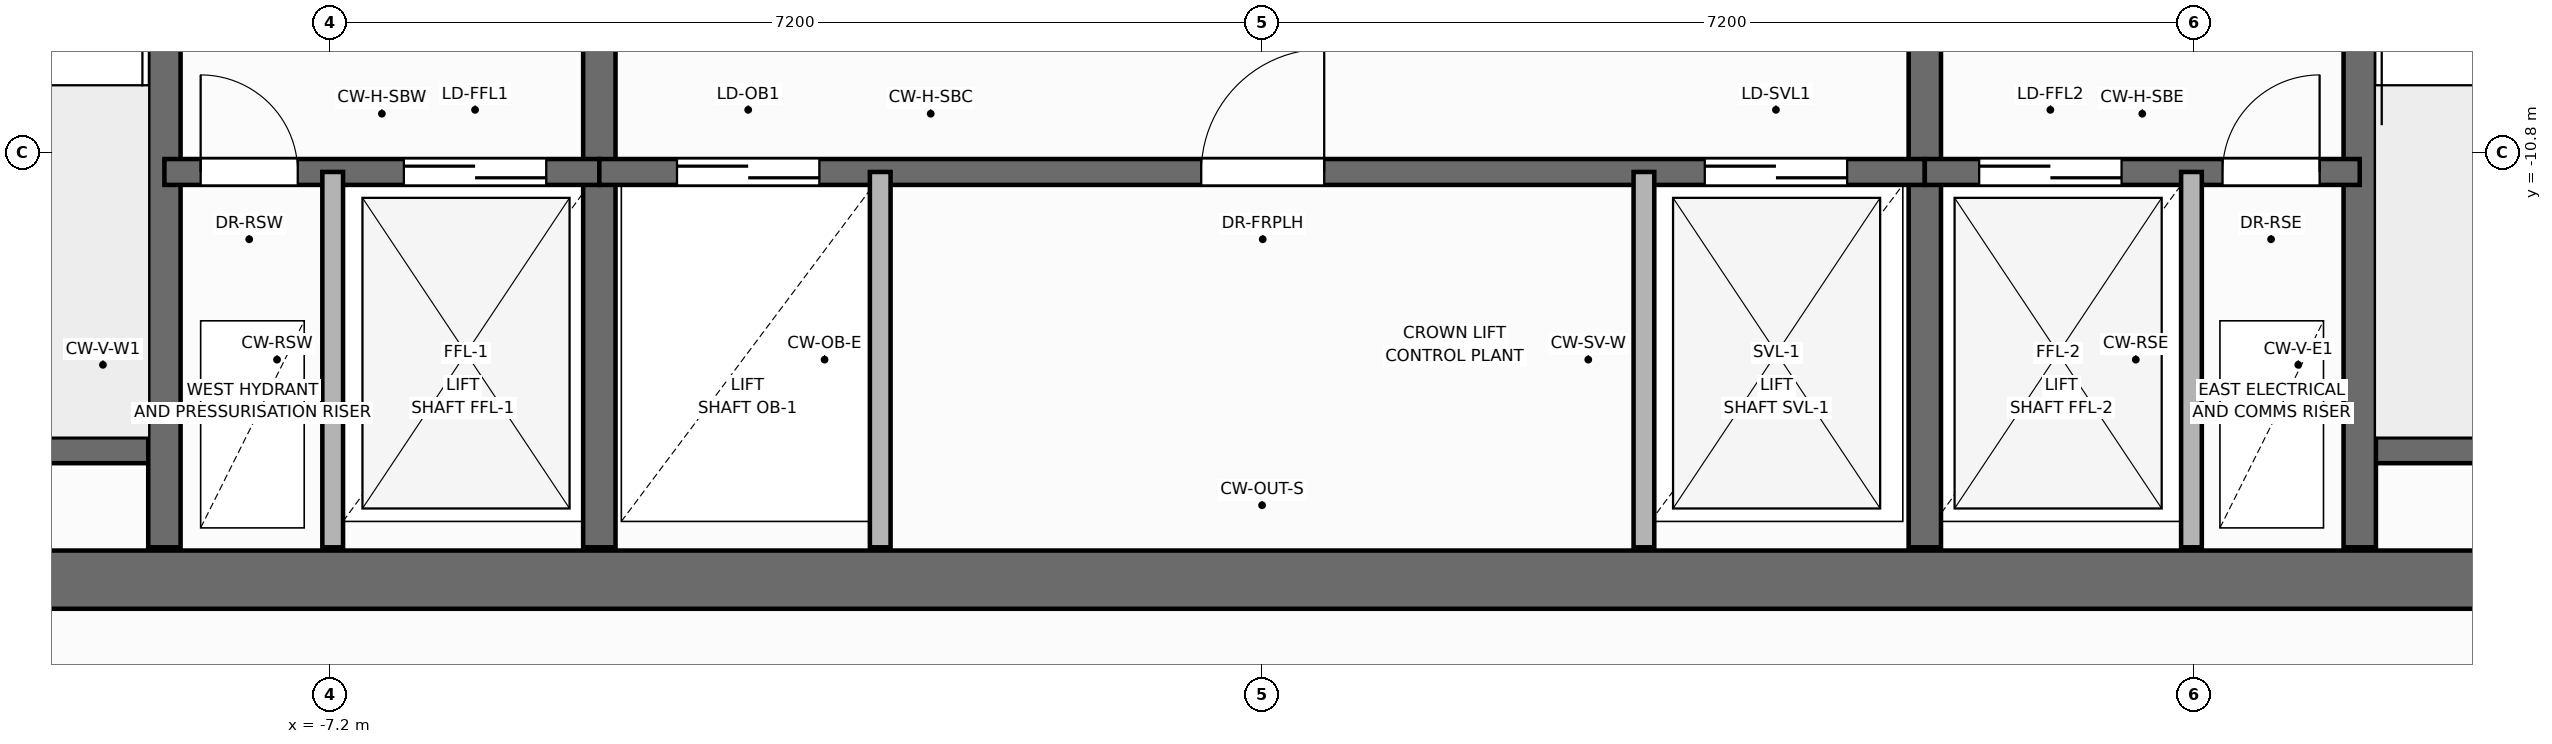
"""IFC4 building model, lengths in metres.
Left out: names, types, materials, properties, quantities, classifications, styles, units other than length and angle.
Written with IfcOpenShell. Run it as: python <this file> out.ifc"""

import sys

from ifc_helpers import new_model, si_unit, direction, frame, frame_2d, origin, place, context, subcontext, project, spatial, rectangle, extrude, element, fill, save


model = new_model("IFC4")
c1 = context("Model", 3, precision=1e-05, world=origin(), true_north=direction((0.0, 1.0)))
c2 = subcontext(c1, "Body", "Model", "MODEL_VIEW")
j1 = project(units=[si_unit("LENGTHUNIT", "METRE"), si_unit("PLANEANGLEUNIT", "RADIAN")], contexts=[c1])
p1 = place(None, origin())
s1 = spatial("IfcSite", under=j1, at=p1, CompositionType="ELEMENT")
p2 = place(p1, origin())
s2 = spatial("IfcBuilding", under=s1, at=p2, CompositionType="ELEMENT")
p3 = place(p2, frame((0.0, 0.0, 297.6)))
s3 = spatial("IfcBuildingStorey", under=s2, at=p3, CompositionType="ELEMENT", Elevation=297.6)
p4 = place(p3, frame((-12.65, -14.1, 0.0), z_axis=(0.0, 0.0, 1.0), x_axis=(1.0, 0.0, 0.0)))
e1 = element("IfcWall", 1, at=p4, inside=s3, PredefinedType="SHEAR", context=c2, shape_type="SweptSolid", body=[
    extrude(rectangle(XDim=25.3, YDim=0.45, at=frame_2d((12.65, 0.0))), origin(), (0.0, 0.0, 1.0), 4.2),
])
for number, where, z_axis, x_axis in (
    (2, (-12.35, -13.1, 0.0), (0.0, 0.0, 1.0), (1.0, 0.0, 0.0)),
    (3, (8.48, -13.1, 0.0), (0.0, 0.0, 1.0), (1.0, 0.0, 0.0)),
):
    element("IfcWall", number, at=place(p3, frame(where, z_axis=z_axis, x_axis=x_axis)), inside=s3, PredefinedType="SOLIDWALL", context=c2, shape_type="SweptSolid", body=[
        extrude(rectangle(XDim=3.87, YDim=0.2, at=frame_2d((1.935, 0.0))), origin(), (0.0, 0.0, 1.0), 4.2),
    ])
p5 = place(p3, frame((-8.48, -13.85, 0.0), z_axis=(0.0, 0.0, 1.0), x_axis=(0.0, 1.0, 0.0)))
e4 = element("IfcWall", 4, at=p5, inside=s3, PredefinedType="SHEAR", context=c2, shape_type="SweptSolid", body=[
    extrude(rectangle(XDim=9.4, YDim=0.25, at=frame_2d((4.7, 0.0))), origin(), (0.0, 0.0, 1.0), 4.2),
])
p6 = place(p5, frame((6.95, 0.0, 0.0)))
e5 = element("IfcOpeningElement", 5, at=p6, cuts=e4, PredefinedType="OPENING", context=c2, shape_type="SweptSolid", body=[
    extrude(rectangle(XDim=1.006, YDim=2.104, at=frame_2d((0.5, 1.052))), frame((0.0, 0.135, 0.0), z_axis=(0.0, -1.0, 0.0), x_axis=(1.0, 0.0, 0.0)), (0.0, 0.0, 1.0), 0.27),
])
p7 = place(p3, frame((8.48, -13.85, 0.0), z_axis=(0.0, 0.0, 1.0), x_axis=(0.0, 1.0, 0.0)))
e6 = element("IfcWall", 6, at=p7, inside=s3, PredefinedType="SHEAR", context=c2, shape_type="SweptSolid", body=[
    extrude(rectangle(XDim=9.4, YDim=0.25, at=frame_2d((4.7, 0.0))), origin(), (0.0, 0.0, 1.0), 4.2),
])
p8 = place(p7, frame((6.95, 0.0, 0.0)))
e7 = element("IfcOpeningElement", 7, at=p8, cuts=e6, PredefinedType="OPENING", context=c2, shape_type="SweptSolid", body=[
    extrude(rectangle(XDim=1.006, YDim=2.104, at=frame_2d((0.5, 1.052))), frame((0.0, 0.135, 0.0), z_axis=(0.0, -1.0, 0.0), x_axis=(1.0, 0.0, 0.0)), (0.0, 0.0, 1.0), 0.27),
])
for number, where, z_axis, x_axis in (
    (8, (-5.12, -13.85, 0.0), (0.0, 0.0, 1.0), (0.0, 1.0, 0.0)),
    (9, (5.12, -13.85, 0.0), (0.0, 0.0, 1.0), (0.0, 1.0, 0.0)),
):
    element("IfcWall", number, at=place(p3, frame(where, z_axis=z_axis, x_axis=x_axis)), inside=s3, PredefinedType="SHEAR", context=c2, shape_type="SweptSolid", body=[
        extrude(rectangle(XDim=9.4, YDim=0.25, at=frame_2d((4.7, 0.0))), origin(), (0.0, 0.0, 1.0), 4.2),
    ])
p9 = place(p3, frame((-8.48, -10.95, 0.0), z_axis=(0.0, 0.0, 1.0), x_axis=(1.0, 0.0, 0.0)))
e10 = element("IfcWall", 10, at=p9, inside=s3, PredefinedType="SOLIDWALL", context=c2, shape_type="SweptSolid", body=[
    extrude(rectangle(XDim=3.36, YDim=0.2, at=frame_2d((1.68, 0.0))), origin(), (0.0, 0.0, 1.0), 4.2),
])
p10 = place(p9, frame((0.28, 0.0, 0.0)))
e11 = element("IfcOpeningElement", 11, at=p10, cuts=e10, PredefinedType="OPENING", context=c2, shape_type="SweptSolid", body=[
    extrude(rectangle(XDim=0.756, YDim=2.054, at=frame_2d((0.375, 1.027))), frame((0.0, 0.11, 0.0), z_axis=(0.0, -1.0, 0.0), x_axis=(1.0, 0.0, 0.0)), (0.0, 0.0, 1.0), 0.22),
])
p11 = place(p9, frame((1.85, 0.0, 0.0)))
e12 = element("IfcOpeningElement", 12, at=p11, cuts=e10, PredefinedType="OPENING", context=c2, shape_type="SweptSolid", body=[
    extrude(rectangle(XDim=1.106, YDim=2.104, at=frame_2d((0.55, 1.052))), frame((0.0, 0.11, 0.0), z_axis=(0.0, -1.0, 0.0), x_axis=(1.0, 0.0, 0.0)), (0.0, 0.0, 1.0), 0.22),
])
p12 = place(p3, frame((-5.12, -10.95, 0.0), z_axis=(0.0, 0.0, 1.0), x_axis=(1.0, 0.0, 0.0)))
e13 = element("IfcWall", 13, at=p12, inside=s3, PredefinedType="SOLIDWALL", context=c2, shape_type="SweptSolid", body=[
    extrude(rectangle(XDim=10.24, YDim=0.2, at=frame_2d((5.12, 0.0))), origin(), (0.0, 0.0, 1.0), 4.2),
])
p13 = place(p12, frame((0.6, 0.0, 0.0)))
e14 = element("IfcOpeningElement", 14, at=p13, cuts=e13, PredefinedType="OPENING", context=c2, shape_type="SweptSolid", body=[
    extrude(rectangle(XDim=1.106, YDim=2.104, at=frame_2d((0.55, 1.052))), frame((0.0, 0.11, 0.0), z_axis=(0.0, -1.0, 0.0), x_axis=(1.0, 0.0, 0.0)), (0.0, 0.0, 1.0), 0.22),
])
p14 = place(p12, frame((4.65, 0.0, 0.0)))
e15 = element("IfcOpeningElement", 15, at=p14, cuts=e13, PredefinedType="OPENING", context=c2, shape_type="SweptSolid", body=[
    extrude(rectangle(XDim=0.956, YDim=2.104, at=frame_2d((0.475, 1.052))), frame((0.0, 0.11, 0.0), z_axis=(0.0, -1.0, 0.0), x_axis=(1.0, 0.0, 0.0)), (0.0, 0.0, 1.0), 0.22),
])
p15 = place(p12, frame((8.54, 0.0, 0.0)))
e16 = element("IfcOpeningElement", 16, at=p15, cuts=e13, PredefinedType="OPENING", context=c2, shape_type="SweptSolid", body=[
    extrude(rectangle(XDim=1.106, YDim=2.104, at=frame_2d((0.55, 1.052))), frame((0.0, 0.11, 0.0), z_axis=(0.0, -1.0, 0.0), x_axis=(1.0, 0.0, 0.0)), (0.0, 0.0, 1.0), 0.22),
])
p16 = place(p3, frame((5.12, -10.95, 0.0), z_axis=(0.0, 0.0, 1.0), x_axis=(1.0, 0.0, 0.0)))
e17 = element("IfcWall", 17, at=p16, inside=s3, PredefinedType="SOLIDWALL", context=c2, shape_type="SweptSolid", body=[
    extrude(rectangle(XDim=3.36, YDim=0.2, at=frame_2d((1.68, 0.0))), origin(), (0.0, 0.0, 1.0), 4.2),
])
p17 = place(p16, frame((0.42, 0.0, 0.0)))
e18 = element("IfcOpeningElement", 18, at=p17, cuts=e17, PredefinedType="OPENING", context=c2, shape_type="SweptSolid", body=[
    extrude(rectangle(XDim=1.106, YDim=2.104, at=frame_2d((0.55, 1.052))), frame((0.0, 0.11, 0.0), z_axis=(0.0, -1.0, 0.0), x_axis=(1.0, 0.0, 0.0)), (0.0, 0.0, 1.0), 0.22),
])
p18 = place(p16, frame((2.3, 0.0, 0.0)))
e19 = element("IfcOpeningElement", 19, at=p18, cuts=e17, PredefinedType="OPENING", context=c2, shape_type="SweptSolid", body=[
    extrude(rectangle(XDim=0.756, YDim=2.054, at=frame_2d((0.375, 1.027))), frame((0.0, 0.11, 0.0), z_axis=(0.0, -1.0, 0.0), x_axis=(1.0, 0.0, 0.0)), (0.0, 0.0, 1.0), 0.22),
])
for number, where, z_axis, x_axis in (
    (20, (-7.18, -13.85, 0.0), (0.0, 0.0, 1.0), (0.0, 1.0, 0.0)),
    (21, (7.18, -13.85, 0.0), (0.0, 0.0, 1.0), (0.0, 1.0, 0.0)),
    (22, (-2.95, -13.85, 0.0), (0.0, 0.0, 1.0), (0.0, 1.0, 0.0)),
    (23, (2.95, -13.85, 0.0), (0.0, 0.0, 1.0), (0.0, 1.0, 0.0)),
):
    element("IfcWall", number, at=place(p3, frame(where, z_axis=z_axis, x_axis=x_axis)), inside=s3, PredefinedType="PARTITIONING", context=c2, shape_type="SweptSolid", body=[
        extrude(rectangle(XDim=2.9, YDim=0.16, at=frame_2d((1.45, 0.0))), origin(), (0.0, 0.0, 1.0), 3.105),
    ])
p19 = place(p10, origin())
e24 = element("IfcDoor", 24, at=p19, inside=s3, OperationType="SINGLE_SWING_LEFT", PredefinedType="DOOR", context=c2, shape_type="SweptSolid", body=[
    extrude(rectangle(XDim=0.75, YDim=2.05, at=frame_2d((0.375, 1.025))), frame((0.0, 0.025, 0.0), z_axis=(0.0, -1.0, 0.0), x_axis=(1.0, 0.0, 0.0)), (0.0, 0.0, 1.0), 0.05),
])
fill(e11, e24)
p20 = place(p11, origin())
e25 = element("IfcDoor", 25, at=p20, inside=s3, OperationType="DOUBLE_DOOR_SLIDING", PredefinedType="DOOR", context=c2, shape_type="SweptSolid", body=[
    extrude(rectangle(XDim=1.1, YDim=2.1, at=frame_2d((0.55, 1.05))), frame((0.0, 0.025, 0.0), z_axis=(0.0, -1.0, 0.0), x_axis=(1.0, 0.0, 0.0)), (0.0, 0.0, 1.0), 0.05),
])
fill(e12, e25)
p21 = place(p17, origin())
e26 = element("IfcDoor", 26, at=p21, inside=s3, OperationType="DOUBLE_DOOR_SLIDING", PredefinedType="DOOR", context=c2, shape_type="SweptSolid", body=[
    extrude(rectangle(XDim=1.1, YDim=2.1, at=frame_2d((0.55, 1.05))), frame((0.0, 0.025, 0.0), z_axis=(0.0, -1.0, 0.0), x_axis=(1.0, 0.0, 0.0)), (0.0, 0.0, 1.0), 0.05),
])
fill(e18, e26)
p22 = place(p18, origin())
e27 = element("IfcDoor", 27, at=p22, inside=s3, OperationType="SINGLE_SWING_RIGHT", PredefinedType="DOOR", context=c2, shape_type="SweptSolid", body=[
    extrude(rectangle(XDim=0.75, YDim=2.05, at=frame_2d((0.375, 1.025))), frame((0.0, 0.025, 0.0), z_axis=(0.0, -1.0, 0.0), x_axis=(1.0, 0.0, 0.0)), (0.0, 0.0, 1.0), 0.05),
])
fill(e19, e27)
p23 = place(p13, origin())
e28 = element("IfcDoor", 28, at=p23, inside=s3, OperationType="DOUBLE_DOOR_SLIDING", PredefinedType="DOOR", context=c2, shape_type="SweptSolid", body=[
    extrude(rectangle(XDim=1.1, YDim=2.1, at=frame_2d((0.55, 1.05))), frame((0.0, 0.025, 0.0), z_axis=(0.0, -1.0, 0.0), x_axis=(1.0, 0.0, 0.0)), (0.0, 0.0, 1.0), 0.05),
])
fill(e14, e28)
p24 = place(p14, origin())
e29 = element("IfcDoor", 29, at=p24, inside=s3, OperationType="SINGLE_SWING_RIGHT", PredefinedType="DOOR", context=c2, shape_type="SweptSolid", body=[
    extrude(rectangle(XDim=0.95, YDim=2.1, at=frame_2d((0.475, 1.05))), frame((0.0, 0.025, 0.0), z_axis=(0.0, -1.0, 0.0), x_axis=(1.0, 0.0, 0.0)), (0.0, 0.0, 1.0), 0.05),
])
fill(e15, e29)
p25 = place(p15, origin())
e30 = element("IfcDoor", 30, at=p25, inside=s3, OperationType="DOUBLE_DOOR_SLIDING", PredefinedType="DOOR", context=c2, shape_type="SweptSolid", body=[
    extrude(rectangle(XDim=1.1, YDim=2.1, at=frame_2d((0.55, 1.05))), frame((0.0, 0.025, 0.0), z_axis=(0.0, -1.0, 0.0), x_axis=(1.0, 0.0, 0.0)), (0.0, 0.0, 1.0), 0.05),
])
fill(e16, e30)
save(model, sys.argv[1])
